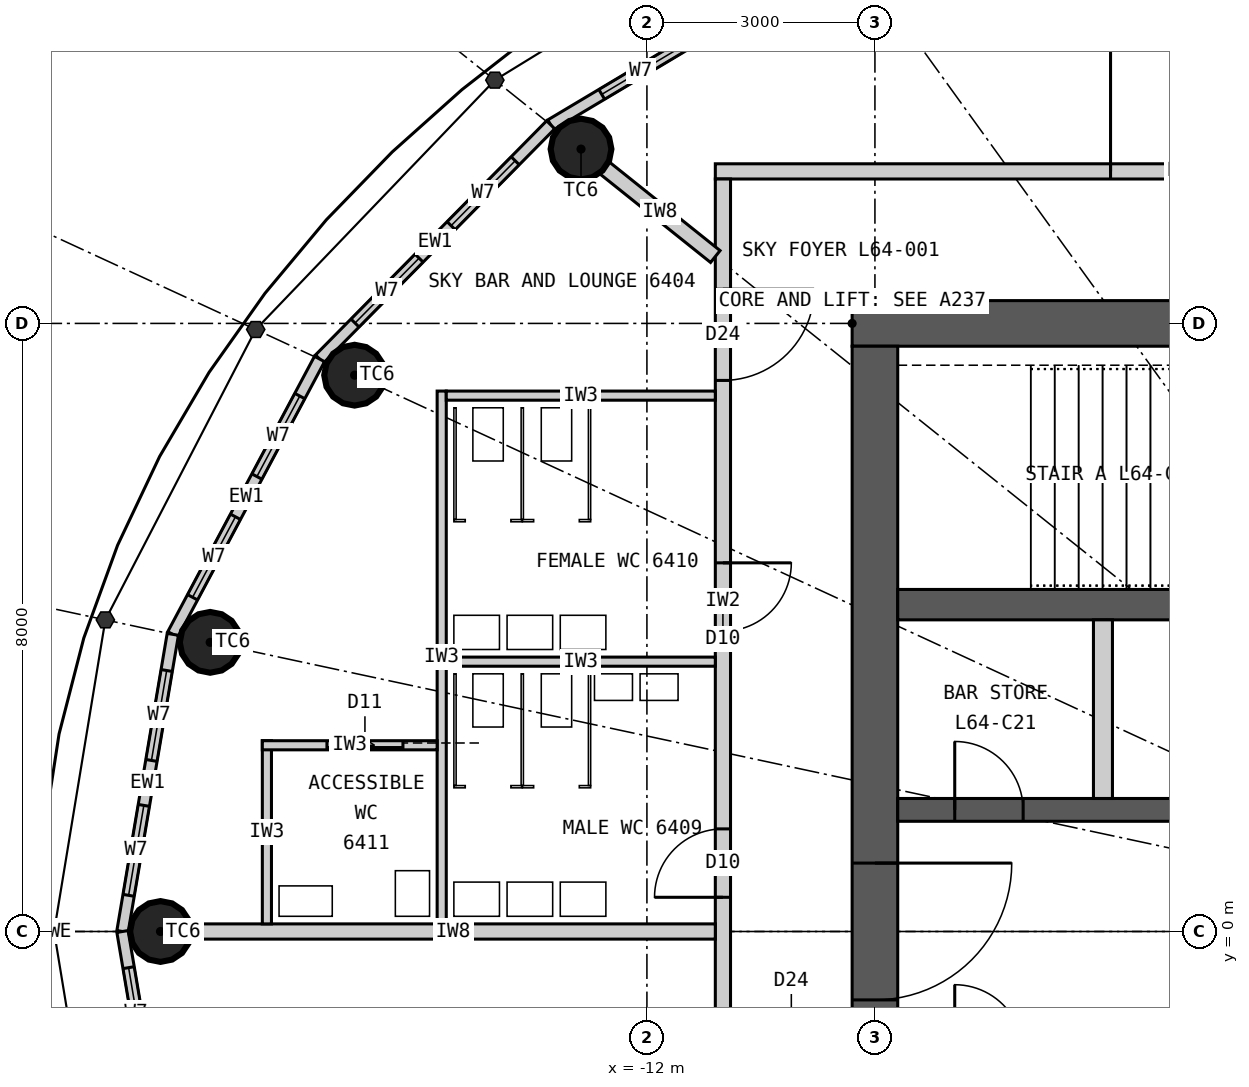
"""IFC4 building model, lengths in metres.
Left out: names, types, materials, properties, quantities, classifications, styles, units other than length and angle.
Written with IfcOpenShell. Run it as: python <this file> out.ifc"""

import sys

from ifc_helpers import new_model, si_unit, direction, frame, frame_2d, origin, origin_2d, place, context, subcontext, project, spatial, rectangle, circle, extrude, element, fill, save


model = new_model("IFC4")
c1 = context("Model", 3, precision=1e-05, world=origin(), true_north=direction((0.0, 1.0)))
c2 = subcontext(c1, "Body", "Model", "MODEL_VIEW")
j1 = project(units=[si_unit("LENGTHUNIT", "METRE"), si_unit("PLANEANGLEUNIT", "RADIAN")], contexts=[c1])
p1 = place(None, origin())
s1 = spatial("IfcSite", under=j1, at=p1, CompositionType="ELEMENT")
p2 = place(p1, origin())
s2 = spatial("IfcBuilding", under=s1, at=p2, CompositionType="ELEMENT")
p3 = place(p2, frame((0.0, 0.0, 237.3)))
s3 = spatial("IfcBuildingStorey", under=s2, at=p3, CompositionType="ELEMENT", Elevation=237.3)
for number, where, z_axis, x_axis in (
    (1, (-12.867, 10.294, 0.0), (0.0, 0.0, 1.0), (1.0, 0.0, 0.0)),
    (2, (-15.846, 7.319, 0.0), (0.0, 0.0, 1.0), (1.0, 0.0, 0.0)),
    (3, (-17.746, 3.804, 0.0), (0.0, 0.0, 1.0), (1.0, 0.0, 0.0)),
    (4, (-18.4, 0.0, 0.0), (0.0, 0.0, 1.0), (1.0, 0.0, 0.0)),
):
    element("IfcColumn", number, at=place(p3, frame(where, z_axis=z_axis, x_axis=x_axis)), inside=s3, PredefinedType="COLUMN", context=c2, shape_type="SweptSolid", body=[
        extrude(circle(Radius=0.4, at=origin_2d()), origin(), (0.0, 0.0, 1.0), 5.4),
    ])
p4 = place(p3, frame((-9.3, 8.0, 0.0), z_axis=(0.0, 0.0, 1.0), x_axis=(1.0, 0.0, 0.0)))
e5 = element("IfcWall", 5, at=p4, inside=s3, PredefinedType="SHEAR", context=c2, shape_type="SweptSolid", body=[
    extrude(rectangle(XDim=18.6, YDim=0.6, at=frame_2d((9.3, 0.0))), origin(), (0.0, 0.0, 1.0), 5.4),
])
p5 = place(p4, frame((8.0, 0.0, 0.0)))
e6 = element("IfcOpeningElement", 6, at=p5, cuts=e5, PredefinedType="OPENING", context=c2, shape_type="SweptSolid", body=[
    extrude(rectangle(XDim=1.2, YDim=2.2, at=frame_2d((0.6, 1.1))), frame((0.0, 0.31, 0.0), z_axis=(0.0, -1.0, 0.0), x_axis=(1.0, 0.0, 0.0)), (0.0, 0.0, 1.0), 0.62),
])
p6 = place(p4, frame((15.6, 0.0, 0.0)))
e7 = element("IfcOpeningElement", 7, at=p6, cuts=e5, PredefinedType="OPENING", context=c2, shape_type="SweptSolid", body=[
    extrude(rectangle(XDim=0.9, YDim=2.2, at=frame_2d((0.45, 1.1))), frame((0.0, 0.31, 0.0), z_axis=(0.0, -1.0, 0.0), x_axis=(1.0, 0.0, 0.0)), (0.0, 0.0, 1.0), 0.62),
])
p7 = place(p3, frame((-9.0, 7.7, 0.0), z_axis=(0.0, 0.0, 1.0), x_axis=(0.0, -1.0, 0.0)))
e8 = element("IfcWall", 8, at=p7, inside=s3, PredefinedType="SHEAR", context=c2, shape_type="SweptSolid", body=[
    extrude(rectangle(XDim=15.4, YDim=0.6, at=frame_2d((7.7, 0.0))), origin(), (0.0, 0.0, 1.0), 5.4),
])
p8 = place(p7, frame((6.8, 0.0, 0.0)))
e9 = element("IfcOpeningElement", 9, at=p8, cuts=e8, PredefinedType="OPENING", context=c2, shape_type="SweptSolid", body=[
    extrude(rectangle(XDim=1.8, YDim=2.2, at=frame_2d((0.9, 1.1))), frame((0.0, 0.31, 0.0), z_axis=(0.0, -1.0, 0.0), x_axis=(1.0, 0.0, 0.0)), (0.0, 0.0, 1.0), 0.62),
])
p9 = place(p3, frame((-8.7, 4.3, 0.0), z_axis=(0.0, 0.0, 1.0), x_axis=(1.0, 0.0, 0.0)))
e10 = element("IfcWall", 10, at=p9, inside=s3, PredefinedType="SHEAR", context=c2, shape_type="SweptSolid", body=[
    extrude(rectangle(XDim=17.4, YDim=0.4, at=frame_2d((8.7, 0.0))), origin(), (0.0, 0.0, 1.0), 5.4),
])
p10 = place(p3, frame((-8.7, 1.6, 0.0), z_axis=(0.0, 0.0, 1.0), x_axis=(1.0, 0.0, 0.0)))
e11 = element("IfcWall", 11, at=p10, inside=s3, PredefinedType="SHEAR", context=c2, shape_type="SweptSolid", body=[
    extrude(rectangle(XDim=17.4, YDim=0.3, at=frame_2d((8.7, 0.0))), origin(), (0.0, 0.0, 1.0), 5.4),
])
p11 = place(p10, frame((15.5, 0.0, 0.0)))
e12 = element("IfcOpeningElement", 12, at=p11, cuts=e11, PredefinedType="OPENING", context=c2, shape_type="SweptSolid", body=[
    extrude(rectangle(XDim=1.4, YDim=2.4, at=frame_2d((0.7, 1.2))), frame((0.0, 0.16, 0.0), z_axis=(0.0, -1.0, 0.0), x_axis=(1.0, 0.0, 0.0)), (0.0, 0.0, 1.0), 0.32),
])
p12 = place(p10, frame((0.75, 0.0, 0.0)))
e13 = element("IfcOpeningElement", 13, at=p12, cuts=e11, PredefinedType="OPENING", context=c2, shape_type="SweptSolid", body=[
    extrude(rectangle(XDim=0.9, YDim=2.2, at=frame_2d((0.45, 1.1))), frame((0.0, 0.16, 0.0), z_axis=(0.0, -1.0, 0.0), x_axis=(1.0, 0.0, 0.0)), (0.0, 0.0, 1.0), 0.32),
])
p13 = place(p10, frame((8.25, 0.0, 0.0)))
e14 = element("IfcOpeningElement", 14, at=p13, cuts=e11, PredefinedType="OPENING", context=c2, shape_type="SweptSolid", body=[
    extrude(rectangle(XDim=0.9, YDim=2.2, at=frame_2d((0.45, 1.1))), frame((0.0, 0.16, 0.0), z_axis=(0.0, -1.0, 0.0), x_axis=(1.0, 0.0, 0.0)), (0.0, 0.0, 1.0), 0.32),
])
p14 = place(p3, frame((-6.0, 1.75, 0.0), z_axis=(0.0, 0.0, 1.0), x_axis=(0.0, 1.0, 0.0)))
e15 = element("IfcWall", 15, at=p14, inside=s3, PredefinedType="PARTITIONING", context=c2, shape_type="SweptSolid", body=[
    extrude(rectangle(XDim=2.35, YDim=0.25, at=frame_2d((1.175, 0.0))), origin(), (0.0, 0.0, 1.0), 5.4),
])
p15 = place(p3, frame((-9.346, 12.951, 0.0), z_axis=(0.0, 0.0, 1.0), x_axis=(-0.858849230109, -0.512228464594, 0.0)))
e16 = element("IfcWall", 16, at=p15, inside=s3, PredefinedType="ELEMENTEDWALL", context=c2, shape_type="SweptSolid", body=[
    extrude(rectangle(XDim=4.564, YDim=0.15, at=frame_2d((2.282, 0.0))), origin(), (0.0, 0.0, 1.0), 5.15),
])
p16 = place(p15, frame((0.782, 0.0, 0.5)))
e17 = element("IfcOpeningElement", 17, at=p16, cuts=e16, PredefinedType="OPENING", context=c2, shape_type="SweptSolid", body=[
    extrude(rectangle(XDim=1.2, YDim=3.6, at=frame_2d((0.6, 1.8))), frame((0.0, 0.085, 0.0), z_axis=(0.0, -1.0, 0.0), x_axis=(1.0, 0.0, 0.0)), (0.0, 0.0, 1.0), 0.17),
])
p17 = place(p15, frame((2.582, 0.0, 0.5)))
e18 = element("IfcOpeningElement", 18, at=p17, cuts=e16, PredefinedType="OPENING", context=c2, shape_type="SweptSolid", body=[
    extrude(rectangle(XDim=1.2, YDim=3.6, at=frame_2d((0.6, 1.8))), frame((0.0, 0.085, 0.0), z_axis=(0.0, -1.0, 0.0), x_axis=(1.0, 0.0, 0.0)), (0.0, 0.0, 1.0), 0.17),
])
p18 = place(p3, frame((-13.266, 10.613, 0.0), z_axis=(0.0, 0.0, 1.0), x_axis=(-0.702523956258, -0.711660095048, 0.0)))
e19 = element("IfcWall", 19, at=p18, inside=s3, PredefinedType="ELEMENTEDWALL", context=c2, shape_type="SweptSolid", body=[
    extrude(rectangle(XDim=4.329, YDim=0.15, at=frame_2d((2.165, 0.0))), origin(), (0.0, 0.0, 1.0), 5.15),
])
p19 = place(p18, frame((0.665, 0.0, 0.5)))
e20 = element("IfcOpeningElement", 20, at=p19, cuts=e19, PredefinedType="OPENING", context=c2, shape_type="SweptSolid", body=[
    extrude(rectangle(XDim=1.2, YDim=3.6, at=frame_2d((0.6, 1.8))), frame((0.0, 0.085, 0.0), z_axis=(0.0, -1.0, 0.0), x_axis=(1.0, 0.0, 0.0)), (0.0, 0.0, 1.0), 0.17),
])
p20 = place(p18, frame((2.465, 0.0, 0.5)))
e21 = element("IfcOpeningElement", 21, at=p20, cuts=e19, PredefinedType="OPENING", context=c2, shape_type="SweptSolid", body=[
    extrude(rectangle(XDim=1.2, YDim=3.6, at=frame_2d((0.6, 1.8))), frame((0.0, 0.085, 0.0), z_axis=(0.0, -1.0, 0.0), x_axis=(1.0, 0.0, 0.0)), (0.0, 0.0, 1.0), 0.17),
])
p21 = place(p3, frame((-16.307, 7.532, 0.0), z_axis=(0.0, 0.0, 1.0), x_axis=(-0.470282591286, -0.882515883332, 0.0)))
e22 = element("IfcWall", 22, at=p21, inside=s3, PredefinedType="ELEMENTEDWALL", context=c2, shape_type="SweptSolid", body=[
    extrude(rectangle(XDim=4.105, YDim=0.15, at=frame_2d((2.052, 0.0))), origin(), (0.0, 0.0, 1.0), 5.15),
])
p22 = place(p21, frame((0.552, 0.0, 0.5)))
e23 = element("IfcOpeningElement", 23, at=p22, cuts=e22, PredefinedType="OPENING", context=c2, shape_type="SweptSolid", body=[
    extrude(rectangle(XDim=1.2, YDim=3.6, at=frame_2d((0.6, 1.8))), frame((0.0, 0.085, 0.0), z_axis=(0.0, -1.0, 0.0), x_axis=(1.0, 0.0, 0.0)), (0.0, 0.0, 1.0), 0.17),
])
p23 = place(p21, frame((2.353, 0.0, 0.5)))
e24 = element("IfcOpeningElement", 24, at=p23, cuts=e22, PredefinedType="OPENING", context=c2, shape_type="SweptSolid", body=[
    extrude(rectangle(XDim=1.2, YDim=3.6, at=frame_2d((0.6, 1.8))), frame((0.0, 0.085, 0.0), z_axis=(0.0, -1.0, 0.0), x_axis=(1.0, 0.0, 0.0)), (0.0, 0.0, 1.0), 0.17),
])
p24 = place(p3, frame((-18.238, 3.909, 0.0), z_axis=(0.0, 0.0, 1.0), x_axis=(-0.166984464914, -0.985959526795, 0.0)))
e25 = element("IfcWall", 25, at=p24, inside=s3, PredefinedType="ELEMENTEDWALL", context=c2, shape_type="SweptSolid", body=[
    extrude(rectangle(XDim=3.965, YDim=0.15, at=frame_2d((1.982, 0.0))), origin(), (0.0, 0.0, 1.0), 5.15),
])
p25 = place(p24, frame((0.483, 0.0, 0.5)))
e26 = element("IfcOpeningElement", 26, at=p25, cuts=e25, PredefinedType="OPENING", context=c2, shape_type="SweptSolid", body=[
    extrude(rectangle(XDim=1.2, YDim=3.6, at=frame_2d((0.6, 1.8))), frame((0.0, 0.085, 0.0), z_axis=(0.0, -1.0, 0.0), x_axis=(1.0, 0.0, 0.0)), (0.0, 0.0, 1.0), 0.17),
])
p26 = place(p24, frame((2.282, 0.0, 0.5)))
e27 = element("IfcOpeningElement", 27, at=p26, cuts=e25, PredefinedType="OPENING", context=c2, shape_type="SweptSolid", body=[
    extrude(rectangle(XDim=1.2, YDim=3.6, at=frame_2d((0.6, 1.8))), frame((0.0, 0.085, 0.0), z_axis=(0.0, -1.0, 0.0), x_axis=(1.0, 0.0, 0.0)), (0.0, 0.0, 1.0), 0.17),
])
p27 = place(p3, frame((-18.9, 0.0, 0.0), z_axis=(0.0, 0.0, 1.0), x_axis=(0.166984464914, -0.985959526795, 0.0)))
e28 = element("IfcWall", 28, at=p27, inside=s3, PredefinedType="ELEMENTEDWALL", context=c2, shape_type="SweptSolid", body=[
    extrude(rectangle(XDim=3.965, YDim=0.15, at=frame_2d((1.982, 0.0))), origin(), (0.0, 0.0, 1.0), 5.15),
])
p28 = place(p27, frame((0.483, 0.0, 0.5)))
e29 = element("IfcOpeningElement", 29, at=p28, cuts=e28, PredefinedType="OPENING", context=c2, shape_type="SweptSolid", body=[
    extrude(rectangle(XDim=1.2, YDim=3.6, at=frame_2d((0.6, 1.8))), frame((0.0, 0.085, 0.0), z_axis=(0.0, -1.0, 0.0), x_axis=(1.0, 0.0, 0.0)), (0.0, 0.0, 1.0), 0.17),
])
p29 = place(p27, frame((2.282, 0.0, 0.5)))
e30 = element("IfcOpeningElement", 30, at=p29, cuts=e28, PredefinedType="OPENING", context=c2, shape_type="SweptSolid", body=[
    extrude(rectangle(XDim=1.2, YDim=3.6, at=frame_2d((0.6, 1.8))), frame((0.0, 0.085, 0.0), z_axis=(0.0, -1.0, 0.0), x_axis=(1.0, 0.0, 0.0)), (0.0, 0.0, 1.0), 0.17),
])
p30 = place(p3, frame((-11.1, 10.0, 0.0), z_axis=(0.0, 0.0, 1.0), x_axis=(1.0, 0.0, 0.0)))
e31 = element("IfcWall", 31, at=p30, inside=s3, PredefinedType="PARTITIONING", context=c2, shape_type="SweptSolid", body=[
    extrude(rectangle(XDim=14.7, YDim=0.2, at=frame_2d((7.35, 0.0))), origin(), (0.0, 0.0, 1.0), 5.15),
])
p31 = place(p30, frame((5.2, 0.0, 0.0)))
e32 = element("IfcOpeningElement", 32, at=p31, cuts=e31, PredefinedType="OPENING", context=c2, shape_type="SweptSolid", body=[
    extrude(rectangle(XDim=1.8, YDim=2.4, at=frame_2d((0.9, 1.2))), frame((0.0, 0.11, 0.0), z_axis=(0.0, -1.0, 0.0), x_axis=(1.0, 0.0, 0.0)), (0.0, 0.0, 1.0), 0.22),
])
p32 = place(p30, frame((12.3, 0.0, 0.0)))
e33 = element("IfcOpeningElement", 33, at=p32, cuts=e31, PredefinedType="OPENING", context=c2, shape_type="SweptSolid", body=[
    extrude(rectangle(XDim=1.8, YDim=2.4, at=frame_2d((0.9, 1.2))), frame((0.0, 0.11, 0.0), z_axis=(0.0, -1.0, 0.0), x_axis=(1.0, 0.0, 0.0)), (0.0, 0.0, 1.0), 0.22),
])
p33 = place(p3, frame((-11.0, 9.9, 0.0), z_axis=(0.0, 0.0, 1.0), x_axis=(0.0, -1.0, 0.0)))
e34 = element("IfcWall", 34, at=p33, inside=s3, PredefinedType="PARTITIONING", context=c2, shape_type="SweptSolid", body=[
    extrude(rectangle(XDim=11.1, YDim=0.2, at=frame_2d((5.55, 0.0))), origin(), (0.0, 0.0, 1.0), 5.15),
])
p34 = place(p33, frame((1.45, 0.0, 0.0)))
e35 = element("IfcOpeningElement", 35, at=p34, cuts=e34, PredefinedType="OPENING", context=c2, shape_type="SweptSolid", body=[
    extrude(rectangle(XDim=1.2, YDim=2.2, at=frame_2d((0.6, 1.1))), frame((0.0, 0.11, 0.0), z_axis=(0.0, -1.0, 0.0), x_axis=(1.0, 0.0, 0.0)), (0.0, 0.0, 1.0), 0.22),
])
p35 = place(p33, frame((8.55, 0.0, 0.0)))
e36 = element("IfcOpeningElement", 36, at=p35, cuts=e34, PredefinedType="OPENING", context=c2, shape_type="SweptSolid", body=[
    extrude(rectangle(XDim=0.9, YDim=2.1, at=frame_2d((0.45, 1.05))), frame((0.0, 0.11, 0.0), z_axis=(0.0, -1.0, 0.0), x_axis=(1.0, 0.0, 0.0)), (0.0, 0.0, 1.0), 0.22),
])
p36 = place(p33, frame((5.05, 0.0, 0.0)))
e37 = element("IfcOpeningElement", 37, at=p36, cuts=e34, PredefinedType="OPENING", context=c2, shape_type="SweptSolid", body=[
    extrude(rectangle(XDim=0.9, YDim=2.1, at=frame_2d((0.45, 1.05))), frame((0.0, 0.11, 0.0), z_axis=(0.0, -1.0, 0.0), x_axis=(1.0, 0.0, 0.0)), (0.0, 0.0, 1.0), 0.22),
])
p37 = place(p3, frame((-11.1, 8.88, 0.0), z_axis=(0.0, 0.0, 1.0), x_axis=(-0.780830450176, 0.62474299362, 0.0)))
e38 = element("IfcWall", 38, at=p37, inside=s3, PredefinedType="PARTITIONING", context=c2, shape_type="SweptSolid", body=[
    extrude(rectangle(XDim=1.863, YDim=0.2, at=frame_2d((0.931, 0.0))), origin(), (0.0, 0.0, 1.0), 5.15),
])
p38 = place(p3, frame((-11.1, 0.0, 0.0), z_axis=(0.0, 0.0, 1.0), x_axis=(-1.0, 0.0, 0.0)))
e39 = element("IfcWall", 39, at=p38, inside=s3, PredefinedType="PARTITIONING", context=c2, shape_type="SweptSolid", body=[
    extrude(rectangle(XDim=6.9, YDim=0.2, at=frame_2d((3.45, 0.0))), origin(), (0.0, 0.0, 1.0), 4.3),
])
p39 = place(p3, frame((-14.7, 0.1, 0.0), z_axis=(0.0, 0.0, 1.0), x_axis=(0.0, 1.0, 0.0)))
e40 = element("IfcWall", 40, at=p39, inside=s3, PredefinedType="PARTITIONING", context=c2, shape_type="SweptSolid", body=[
    extrude(rectangle(XDim=7.01, YDim=0.12, at=frame_2d((3.505, 0.0))), origin(), (0.0, 0.0, 1.0), 5.15),
])
for number, where, z_axis, x_axis in (
    (41, (-11.1, 3.55, 0.0), (0.0, 0.0, 1.0), (-1.0, 0.0, 0.0)),
    (42, (-11.1, 7.05, 0.0), (0.0, 0.0, 1.0), (-1.0, 0.0, 0.0)),
):
    element("IfcWall", number, at=place(p3, frame(where, z_axis=z_axis, x_axis=x_axis)), inside=s3, PredefinedType="PARTITIONING", context=c2, shape_type="SweptSolid", body=[
        extrude(rectangle(XDim=3.54, YDim=0.12, at=frame_2d((1.77, 0.0))), origin(), (0.0, 0.0, 1.0), 5.15),
    ])
p40 = place(p3, frame((-17.0, 0.1, 0.0), z_axis=(0.0, 0.0, 1.0), x_axis=(0.0, 1.0, 0.0)))
e43 = element("IfcWall", 43, at=p40, inside=s3, PredefinedType="PARTITIONING", context=c2, shape_type="SweptSolid", body=[
    extrude(rectangle(XDim=2.41, YDim=0.12, at=frame_2d((1.205, 0.0))), origin(), (0.0, 0.0, 1.0), 5.15),
])
p41 = place(p3, frame((-14.76, 2.45, 0.0), z_axis=(0.0, 0.0, 1.0), x_axis=(-1.0, 0.0, 0.0)))
e44 = element("IfcWall", 44, at=p41, inside=s3, PredefinedType="PARTITIONING", context=c2, shape_type="SweptSolid", body=[
    extrude(rectangle(XDim=2.3, YDim=0.12, at=frame_2d((1.15, 0.0))), origin(), (0.0, 0.0, 1.0), 5.15),
])
p42 = place(p41, frame((0.45, 0.0, 0.0)))
e45 = element("IfcOpeningElement", 45, at=p42, cuts=e44, PredefinedType="OPENING", context=c2, shape_type="SweptSolid", body=[
    extrude(rectangle(XDim=1.0, YDim=2.2, at=frame_2d((0.5, 1.1))), frame((0.0, 0.07, 0.0), z_axis=(0.0, -1.0, 0.0), x_axis=(1.0, 0.0, 0.0)), (0.0, 0.0, 1.0), 0.14),
])
p43 = place(p17, origin())
e46 = element("IfcWindow", 46, at=p43, inside=s3, PartitioningType="SINGLE_PANEL", PredefinedType="WINDOW", context=c2, shape_type="SweptSolid", body=[
    extrude(rectangle(XDim=1.2, YDim=3.6, at=frame_2d((0.6, 1.8))), frame((0.0, 0.03, 0.0), z_axis=(0.0, -1.0, 0.0), x_axis=(1.0, 0.0, 0.0)), (0.0, 0.0, 1.0), 0.06),
])
fill(e18, e46)
p44 = place(p19, origin())
e47 = element("IfcWindow", 47, at=p44, inside=s3, PartitioningType="SINGLE_PANEL", PredefinedType="WINDOW", context=c2, shape_type="SweptSolid", body=[
    extrude(rectangle(XDim=1.2, YDim=3.6, at=frame_2d((0.6, 1.8))), frame((0.0, 0.03, 0.0), z_axis=(0.0, -1.0, 0.0), x_axis=(1.0, 0.0, 0.0)), (0.0, 0.0, 1.0), 0.06),
])
fill(e20, e47)
p45 = place(p20, origin())
e48 = element("IfcWindow", 48, at=p45, inside=s3, PartitioningType="SINGLE_PANEL", PredefinedType="WINDOW", context=c2, shape_type="SweptSolid", body=[
    extrude(rectangle(XDim=1.2, YDim=3.6, at=frame_2d((0.6, 1.8))), frame((0.0, 0.03, 0.0), z_axis=(0.0, -1.0, 0.0), x_axis=(1.0, 0.0, 0.0)), (0.0, 0.0, 1.0), 0.06),
])
fill(e21, e48)
p46 = place(p22, origin())
e49 = element("IfcWindow", 49, at=p46, inside=s3, PartitioningType="SINGLE_PANEL", PredefinedType="WINDOW", context=c2, shape_type="SweptSolid", body=[
    extrude(rectangle(XDim=1.2, YDim=3.6, at=frame_2d((0.6, 1.8))), frame((0.0, 0.03, 0.0), z_axis=(0.0, -1.0, 0.0), x_axis=(1.0, 0.0, 0.0)), (0.0, 0.0, 1.0), 0.06),
])
fill(e23, e49)
p47 = place(p23, origin())
e50 = element("IfcWindow", 50, at=p47, inside=s3, PartitioningType="SINGLE_PANEL", PredefinedType="WINDOW", context=c2, shape_type="SweptSolid", body=[
    extrude(rectangle(XDim=1.2, YDim=3.6, at=frame_2d((0.6, 1.8))), frame((0.0, 0.03, 0.0), z_axis=(0.0, -1.0, 0.0), x_axis=(1.0, 0.0, 0.0)), (0.0, 0.0, 1.0), 0.06),
])
fill(e24, e50)
p48 = place(p25, origin())
e51 = element("IfcWindow", 51, at=p48, inside=s3, PartitioningType="SINGLE_PANEL", PredefinedType="WINDOW", context=c2, shape_type="SweptSolid", body=[
    extrude(rectangle(XDim=1.2, YDim=3.6, at=frame_2d((0.6, 1.8))), frame((0.0, 0.03, 0.0), z_axis=(0.0, -1.0, 0.0), x_axis=(1.0, 0.0, 0.0)), (0.0, 0.0, 1.0), 0.06),
])
fill(e26, e51)
p49 = place(p26, origin())
e52 = element("IfcWindow", 52, at=p49, inside=s3, PartitioningType="SINGLE_PANEL", PredefinedType="WINDOW", context=c2, shape_type="SweptSolid", body=[
    extrude(rectangle(XDim=1.2, YDim=3.6, at=frame_2d((0.6, 1.8))), frame((0.0, 0.03, 0.0), z_axis=(0.0, -1.0, 0.0), x_axis=(1.0, 0.0, 0.0)), (0.0, 0.0, 1.0), 0.06),
])
fill(e27, e52)
p50 = place(p28, origin())
e53 = element("IfcWindow", 53, at=p50, inside=s3, PartitioningType="SINGLE_PANEL", PredefinedType="WINDOW", context=c2, shape_type="SweptSolid", body=[
    extrude(rectangle(XDim=1.2, YDim=3.6, at=frame_2d((0.6, 1.8))), frame((0.0, 0.03, 0.0), z_axis=(0.0, -1.0, 0.0), x_axis=(1.0, 0.0, 0.0)), (0.0, 0.0, 1.0), 0.06),
])
fill(e29, e53)
p51 = place(p31, origin())
e54 = element("IfcDoor", 54, at=p51, inside=s3, OperationType="DOUBLE_DOOR_DOUBLE_SWING", PredefinedType="DOOR", context=c2, shape_type="SweptSolid", body=[
    extrude(rectangle(XDim=1.8, YDim=2.4, at=frame_2d((0.9, 1.2))), frame((0.0, 0.025, 0.0), z_axis=(0.0, -1.0, 0.0), x_axis=(1.0, 0.0, 0.0)), (0.0, 0.0, 1.0), 0.05),
])
fill(e32, e54)
p52 = place(p34, origin())
e55 = element("IfcDoor", 55, at=p52, inside=s3, OperationType="SINGLE_SWING_LEFT", PredefinedType="DOOR", context=c2, shape_type="SweptSolid", body=[
    extrude(rectangle(XDim=1.2, YDim=2.2, at=frame_2d((0.6, 1.1))), frame((0.0, 0.025, 0.0), z_axis=(0.0, -1.0, 0.0), x_axis=(1.0, 0.0, 0.0)), (0.0, 0.0, 1.0), 0.05),
])
fill(e35, e55)
p53 = place(p35, origin())
e56 = element("IfcDoor", 56, at=p53, inside=s3, OperationType="SINGLE_SWING_RIGHT", PredefinedType="DOOR", context=c2, shape_type="SweptSolid", body=[
    extrude(rectangle(XDim=0.9, YDim=2.1, at=frame_2d((0.45, 1.05))), frame((0.0, 0.025, 0.0), z_axis=(0.0, -1.0, 0.0), x_axis=(1.0, 0.0, 0.0)), (0.0, 0.0, 1.0), 0.05),
])
fill(e36, e56)
p54 = place(p36, origin())
e57 = element("IfcDoor", 57, at=p54, inside=s3, OperationType="SINGLE_SWING_LEFT", PredefinedType="DOOR", context=c2, shape_type="SweptSolid", body=[
    extrude(rectangle(XDim=0.9, YDim=2.1, at=frame_2d((0.45, 1.05))), frame((0.0, 0.025, 0.0), z_axis=(0.0, -1.0, 0.0), x_axis=(1.0, 0.0, 0.0)), (0.0, 0.0, 1.0), 0.05),
])
fill(e37, e57)
p55 = place(p42, origin())
e58 = element("IfcDoor", 58, at=p55, inside=s3, OperationType="SLIDING_TO_LEFT", PredefinedType="DOOR", context=c2, shape_type="SweptSolid", body=[
    extrude(rectangle(XDim=1.0, YDim=2.2, at=frame_2d((0.5, 1.1))), frame((0.0, 0.025, 0.0), z_axis=(0.0, -1.0, 0.0), x_axis=(1.0, 0.0, 0.0)), (0.0, 0.0, 1.0), 0.05),
])
fill(e45, e58)
p56 = place(p12, origin())
e59 = element("IfcDoor", 59, at=p56, inside=s3, OperationType="SINGLE_SWING_LEFT", PredefinedType="DOOR", context=c2, shape_type="SweptSolid", body=[
    extrude(rectangle(XDim=0.9, YDim=2.2, at=frame_2d((0.45, 1.1))), frame((0.0, 0.025, 0.0), z_axis=(0.0, -1.0, 0.0), x_axis=(1.0, 0.0, 0.0)), (0.0, 0.0, 1.0), 0.05),
])
fill(e13, e59)
p57 = place(p8, origin())
e60 = element("IfcDoor", 60, at=p57, inside=s3, OperationType="DOUBLE_DOOR_DOUBLE_SWING", PredefinedType="DOOR", context=c2, shape_type="SweptSolid", body=[
    extrude(rectangle(XDim=1.8, YDim=2.2, at=frame_2d((0.9, 1.1))), frame((0.0, 0.025, 0.0), z_axis=(0.0, -1.0, 0.0), x_axis=(1.0, 0.0, 0.0)), (0.0, 0.0, 1.0), 0.05),
])
fill(e9, e60)
save(model, sys.argv[1])
